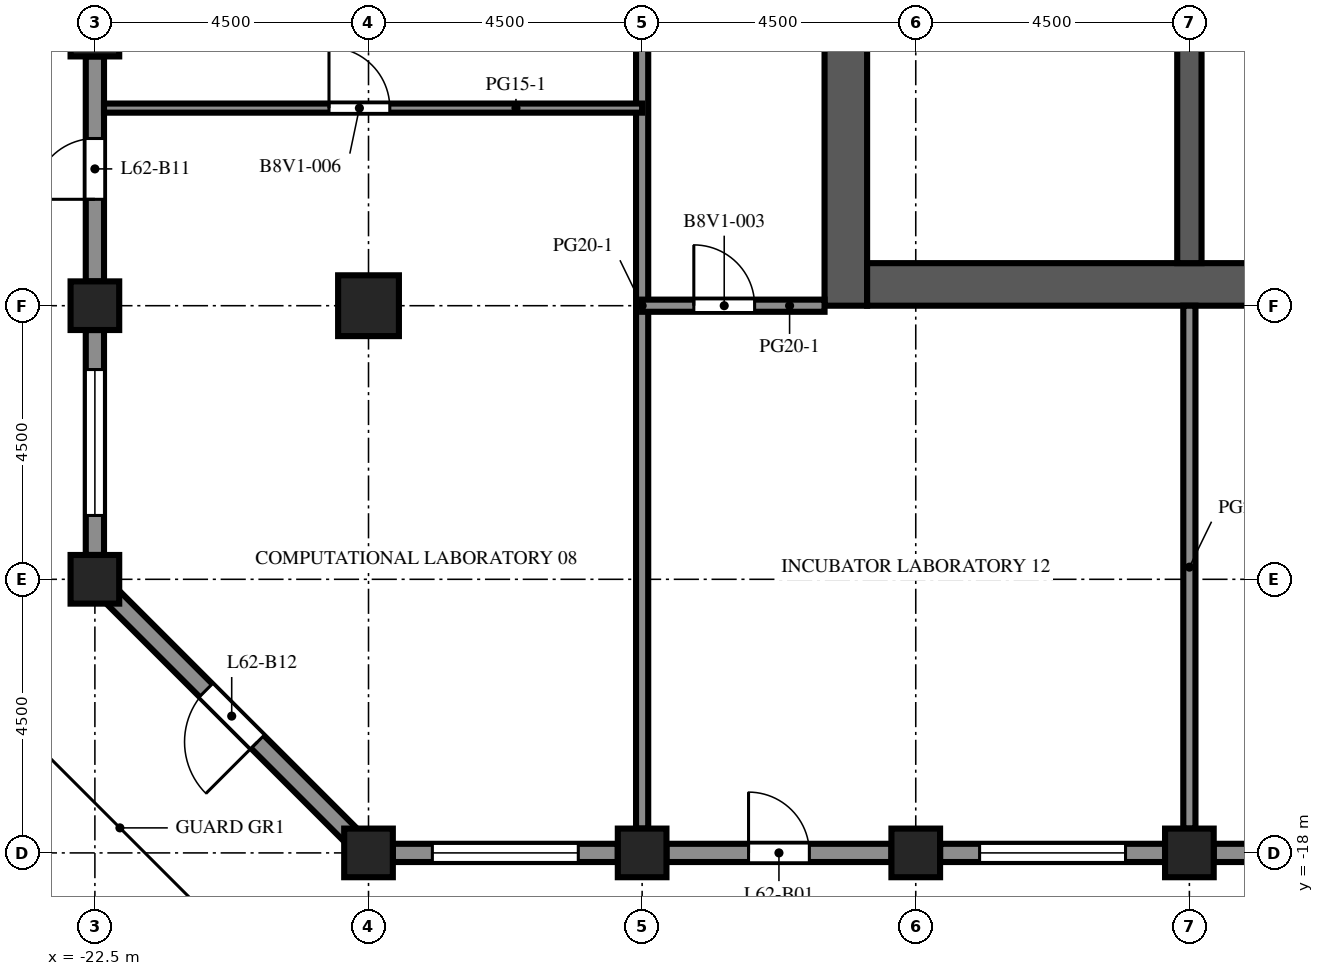
"""IFC4 building model, lengths in metres.
Left out: names, types, materials, properties, quantities, classifications, styles, units other than length and angle.
Written with IfcOpenShell. Run it as: python <this file> out.ifc"""

import sys

from ifc_helpers import new_model, si_unit, direction, frame, frame_2d, origin, origin_2d, place, context, subcontext, project, spatial, rectangle, extrude, element, fill, save


model = new_model("IFC4")
c1 = context("Model", 3, precision=1e-05, world=origin(), true_north=direction((0.0, 1.0)))
c2 = subcontext(c1, "Body", "Model", "MODEL_VIEW")
j1 = project(units=[si_unit("LENGTHUNIT", "METRE"), si_unit("PLANEANGLEUNIT", "RADIAN")], contexts=[c1])
p1 = place(None, origin())
s1 = spatial("IfcSite", under=j1, at=p1, CompositionType="ELEMENT")
p2 = place(p1, origin())
s2 = spatial("IfcBuilding", under=s1, at=p2, CompositionType="ELEMENT")
p3 = place(p2, frame((0.0, 0.0, 274.5)))
s3 = spatial("IfcBuildingStorey", under=s2, at=p3, CompositionType="ELEMENT", Elevation=274.5)
for number, where, z_axis, x_axis in (
    (1, (-22.5, -13.5, 0.0), (0.0, 0.0, 1.0), (1.0, 0.0, 0.0)),
    (2, (-22.5, -9.0, 0.0), (0.0, 0.0, 1.0), (1.0, 0.0, 0.0)),
    (3, (-22.5, -4.5, 0.0), (0.0, 0.0, 1.0), (1.0, 0.0, 0.0)),
    (4, (-18.0, -18.0, 0.0), (0.0, 0.0, 1.0), (1.0, 0.0, 0.0)),
    (5, (-13.5, -18.0, 0.0), (0.0, 0.0, 1.0), (1.0, 0.0, 0.0)),
    (6, (-9.0, -18.0, 0.0), (0.0, 0.0, 1.0), (1.0, 0.0, 0.0)),
    (7, (-4.5, -18.0, 0.0), (0.0, 0.0, 1.0), (1.0, 0.0, 0.0)),
):
    element("IfcColumn", number, at=place(p3, frame(where, z_axis=z_axis, x_axis=x_axis)), inside=s3, PredefinedType="COLUMN", context=c2, shape_type="SweptSolid", body=[
        extrude(rectangle(XDim=0.8, YDim=0.8, at=origin_2d()), origin(), (0.0, 0.0, 1.0), 4.1),
    ])
p4 = place(p3, frame((-18.0, -9.0, 0.0), z_axis=(0.0, 0.0, 1.0), x_axis=(1.0, 0.0, 0.0)))
e8 = element("IfcColumn", 8, at=p4, inside=s3, PredefinedType="COLUMN", context=c2, shape_type="SweptSolid", body=[
    extrude(rectangle(XDim=1.0, YDim=1.0, at=origin_2d()), origin(), (0.0, 0.0, 1.0), 4.1),
])
p5 = place(p3, frame((-10.15, -9.0, 0.0), z_axis=(0.0, 0.0, 1.0), x_axis=(0.0, 1.0, 0.0)))
e9 = element("IfcWall", 9, at=p5, inside=s3, PredefinedType="SHEAR", context=c2, shape_type="SweptSolid", body=[
    extrude(rectangle(XDim=27.5, YDim=0.7, at=frame_2d((13.75, 0.0))), origin(), (0.0, 0.0, 1.0), 4.1),
])
p6 = place(p5, frame((12.55, 0.0, 0.0)))
e10 = element("IfcOpeningElement", 10, at=p6, cuts=e9, PredefinedType="OPENING", context=c2, shape_type="SweptSolid", body=[
    extrude(rectangle(XDim=2.4, YDim=2.4, at=frame_2d((1.2, 1.2))), frame((0.0, 0.36, 0.0), z_axis=(0.0, -1.0, 0.0), x_axis=(1.0, 0.0, 0.0)), (0.0, 0.0, 1.0), 0.72),
])
p7 = place(p5, frame((6.825, 0.0, 0.0)))
e11 = element("IfcOpeningElement", 11, at=p7, cuts=e9, PredefinedType="OPENING", context=c2, shape_type="SweptSolid", body=[
    extrude(rectangle(XDim=1.2, YDim=2.1, at=frame_2d((0.6, 1.05))), frame((0.0, 0.36, 0.0), z_axis=(0.0, -1.0, 0.0), x_axis=(1.0, 0.0, 0.0)), (0.0, 0.0, 1.0), 0.72),
])
p8 = place(p5, frame((19.475, 0.0, 0.0)))
e12 = element("IfcOpeningElement", 12, at=p8, cuts=e9, PredefinedType="OPENING", context=c2, shape_type="SweptSolid", body=[
    extrude(rectangle(XDim=1.2, YDim=2.1, at=frame_2d((0.6, 1.05))), frame((0.0, 0.36, 0.0), z_axis=(0.0, -1.0, 0.0), x_axis=(1.0, 0.0, 0.0)), (0.0, 0.0, 1.0), 0.72),
])
p9 = place(p3, frame((-9.8, -8.65, 0.0), z_axis=(0.0, 0.0, 1.0), x_axis=(1.0, 0.0, 0.0)))
e13 = element("IfcWall", 13, at=p9, inside=s3, PredefinedType="SHEAR", context=c2, shape_type="SweptSolid", body=[
    extrude(rectangle(XDim=10.6, YDim=0.7, at=frame_2d((5.3, 0.0))), origin(), (0.0, 0.0, 1.0), 4.1),
])
p10 = place(p3, frame((-4.5, -8.3, 0.0), z_axis=(0.0, 0.0, 1.0), x_axis=(0.0, 1.0, 0.0)))
e14 = element("IfcWall", 14, at=p10, inside=s3, PredefinedType="SHEAR", context=c2, shape_type="SweptSolid", body=[
    extrude(rectangle(XDim=7.6, YDim=0.4, at=frame_2d((3.8, 0.0))), origin(), (0.0, 0.0, 1.0), 4.1),
])
p11 = place(p3, frame((-13.9, -18.0, 0.0), z_axis=(0.0, 0.0, 1.0), x_axis=(-1.0, 0.0, 0.0)))
e15 = element("IfcWall", 15, at=p11, inside=s3, PredefinedType="SOLIDWALL", context=c2, shape_type="SweptSolid", body=[
    extrude(rectangle(XDim=3.7, YDim=0.3, at=frame_2d((1.85, 0.0))), origin(), (0.0, 0.0, 1.0), 2.85),
])
p12 = place(p11, frame((0.65, 0.0, 0.8)))
e16 = element("IfcOpeningElement", 16, at=p12, cuts=e15, PredefinedType="OPENING", context=c2, shape_type="SweptSolid", body=[
    extrude(rectangle(XDim=2.4, YDim=1.7, at=frame_2d((1.2, 0.85))), frame((0.0, 0.16, 0.0), z_axis=(0.0, -1.0, 0.0), x_axis=(1.0, 0.0, 0.0)), (0.0, 0.0, 1.0), 0.32),
])
p13 = place(p3, frame((-9.4, -18.0, 0.0), z_axis=(0.0, 0.0, 1.0), x_axis=(-1.0, 0.0, 0.0)))
e17 = element("IfcWall", 17, at=p13, inside=s3, PredefinedType="SOLIDWALL", context=c2, shape_type="SweptSolid", body=[
    extrude(rectangle(XDim=3.7, YDim=0.3, at=frame_2d((1.85, 0.0))), origin(), (0.0, 0.0, 1.0), 2.85),
])
p14 = place(p13, frame((1.35, 0.0, 0.0)))
e18 = element("IfcOpeningElement", 18, at=p14, cuts=e17, PredefinedType="OPENING", context=c2, shape_type="SweptSolid", body=[
    extrude(rectangle(XDim=1.0, YDim=2.2, at=frame_2d((0.5, 1.1))), frame((0.0, 0.16, 0.0), z_axis=(0.0, -1.0, 0.0), x_axis=(1.0, 0.0, 0.0)), (0.0, 0.0, 1.0), 0.32),
])
p15 = place(p3, frame((-4.9, -18.0, 0.0), z_axis=(0.0, 0.0, 1.0), x_axis=(-1.0, 0.0, 0.0)))
e19 = element("IfcWall", 19, at=p15, inside=s3, PredefinedType="SOLIDWALL", context=c2, shape_type="SweptSolid", body=[
    extrude(rectangle(XDim=3.7, YDim=0.3, at=frame_2d((1.85, 0.0))), origin(), (0.0, 0.0, 1.0), 2.85),
])
p16 = place(p15, frame((0.65, 0.0, 0.8)))
e20 = element("IfcOpeningElement", 20, at=p16, cuts=e19, PredefinedType="OPENING", context=c2, shape_type="SweptSolid", body=[
    extrude(rectangle(XDim=2.4, YDim=1.7, at=frame_2d((1.2, 0.85))), frame((0.0, 0.16, 0.0), z_axis=(0.0, -1.0, 0.0), x_axis=(1.0, 0.0, 0.0)), (0.0, 0.0, 1.0), 0.32),
])
p17 = place(p3, frame((-0.4, -18.0, 0.0), z_axis=(0.0, 0.0, 1.0), x_axis=(-1.0, 0.0, 0.0)))
e21 = element("IfcWall", 21, at=p17, inside=s3, PredefinedType="SOLIDWALL", context=c2, shape_type="SweptSolid", body=[
    extrude(rectangle(XDim=3.7, YDim=0.3, at=frame_2d((1.85, 0.0))), origin(), (0.0, 0.0, 1.0), 2.85),
])
p18 = place(p17, frame((0.65, 0.0, 0.8)))
e22 = element("IfcOpeningElement", 22, at=p18, cuts=e21, PredefinedType="OPENING", context=c2, shape_type="SweptSolid", body=[
    extrude(rectangle(XDim=2.4, YDim=1.7, at=frame_2d((1.2, 0.85))), frame((0.0, 0.16, 0.0), z_axis=(0.0, -1.0, 0.0), x_axis=(1.0, 0.0, 0.0)), (0.0, 0.0, 1.0), 0.32),
])
p19 = place(p3, frame((-22.5, -8.6, 0.0), z_axis=(0.0, 0.0, 1.0), x_axis=(0.0, 1.0, 0.0)))
e23 = element("IfcWall", 23, at=p19, inside=s3, PredefinedType="SOLIDWALL", context=c2, shape_type="SweptSolid", body=[
    extrude(rectangle(XDim=3.7, YDim=0.3, at=frame_2d((1.85, 0.0))), origin(), (0.0, 0.0, 1.0), 2.85),
])
p20 = place(p19, frame((1.35, 0.0, 0.0)))
e24 = element("IfcOpeningElement", 24, at=p20, cuts=e23, PredefinedType="OPENING", context=c2, shape_type="SweptSolid", body=[
    extrude(rectangle(XDim=1.0, YDim=2.2, at=frame_2d((0.5, 1.1))), frame((0.0, 0.16, 0.0), z_axis=(0.0, -1.0, 0.0), x_axis=(1.0, 0.0, 0.0)), (0.0, 0.0, 1.0), 0.32),
])
p21 = place(p3, frame((-22.5, -13.1, 0.0), z_axis=(0.0, 0.0, 1.0), x_axis=(0.0, 1.0, 0.0)))
e25 = element("IfcWall", 25, at=p21, inside=s3, PredefinedType="SOLIDWALL", context=c2, shape_type="SweptSolid", body=[
    extrude(rectangle(XDim=3.7, YDim=0.3, at=frame_2d((1.85, 0.0))), origin(), (0.0, 0.0, 1.0), 2.85),
])
p22 = place(p21, frame((0.65, 0.0, 0.8)))
e26 = element("IfcOpeningElement", 26, at=p22, cuts=e25, PredefinedType="OPENING", context=c2, shape_type="SweptSolid", body=[
    extrude(rectangle(XDim=2.4, YDim=1.7, at=frame_2d((1.2, 0.85))), frame((0.0, 0.16, 0.0), z_axis=(0.0, -1.0, 0.0), x_axis=(1.0, 0.0, 0.0)), (0.0, 0.0, 1.0), 0.32),
])
p23 = place(p3, frame((-18.294, -17.706, 0.0), z_axis=(0.0, 0.0, 1.0), x_axis=(-0.707106781187, 0.707106781187, 0.0)))
e27 = element("IfcWall", 27, at=p23, inside=s3, PredefinedType="SOLIDWALL", context=c2, shape_type="SweptSolid", body=[
    extrude(rectangle(XDim=5.532, YDim=0.3, at=frame_2d((2.766, 0.0))), origin(), (0.0, 0.0, 1.0), 2.85),
])
p24 = place(p23, frame((2.166, 0.0, 0.0)))
e28 = element("IfcOpeningElement", 28, at=p24, cuts=e27, PredefinedType="OPENING", context=c2, shape_type="SweptSolid", body=[
    extrude(rectangle(XDim=1.2, YDim=2.2, at=frame_2d((0.6, 1.1))), frame((0.0, 0.16, 0.0), z_axis=(0.0, -1.0, 0.0), x_axis=(1.0, 0.0, 0.0)), (0.0, 0.0, 1.0), 0.32),
])
p25 = place(p3, frame((-4.3, -6.02, 0.0), z_axis=(0.0, 0.0, 1.0), x_axis=(1.0, 0.0, 0.0)))
e29 = element("IfcWall", 29, at=p25, inside=s3, PredefinedType="PARTITIONING", context=c2, shape_type="SweptSolid", body=[
    extrude(rectangle(XDim=3.5, YDim=0.1, at=frame_2d((1.75, 0.0))), origin(), (0.0, 0.0, 1.0), 3.65),
])
p26 = place(p3, frame((-13.5, -17.6, 0.0), z_axis=(0.0, 0.0, 1.0), x_axis=(0.0, 1.0, 0.0)))
e30 = element("IfcWall", 30, at=p26, inside=s3, PredefinedType="PARTITIONING", context=c2, shape_type="SweptSolid", body=[
    extrude(rectangle(XDim=20.85, YDim=0.2, at=frame_2d((10.425, 0.0))), origin(), (0.0, 0.0, 1.0), 3.65),
])
p27 = place(p26, frame((17.2, 0.0, 0.0)))
e31 = element("IfcOpeningElement", 31, at=p27, cuts=e30, PredefinedType="OPENING", context=c2, shape_type="SweptSolid", body=[
    extrude(rectangle(XDim=1.0, YDim=2.1, at=frame_2d((0.5, 1.05))), frame((0.0, 0.11, 0.0), z_axis=(0.0, -1.0, 0.0), x_axis=(1.0, 0.0, 0.0)), (0.0, 0.0, 1.0), 0.22),
])
p28 = place(p3, frame((-4.5, -17.6, 0.0), z_axis=(0.0, 0.0, 1.0), x_axis=(0.0, 1.0, 0.0)))
e32 = element("IfcWall", 32, at=p28, inside=s3, PredefinedType="PARTITIONING", context=c2, shape_type="SweptSolid", body=[
    extrude(rectangle(XDim=8.6, YDim=0.2, at=frame_2d((4.3, 0.0))), origin(), (0.0, 0.0, 1.0), 3.65),
])
p29 = place(p3, frame((-10.5, -9.0, 0.0), z_axis=(0.0, 0.0, 1.0), x_axis=(-1.0, 0.0, 0.0)))
e33 = element("IfcWall", 33, at=p29, inside=s3, PredefinedType="PARTITIONING", context=c2, shape_type="SweptSolid", body=[
    extrude(rectangle(XDim=3.0, YDim=0.2, at=frame_2d((1.5, 0.0))), origin(), (0.0, 0.0, 1.0), 3.65),
])
p30 = place(p29, frame((1.15, 0.0, 0.0)))
e34 = element("IfcOpeningElement", 34, at=p30, cuts=e33, PredefinedType="OPENING", context=c2, shape_type="SweptSolid", body=[
    extrude(rectangle(XDim=1.0, YDim=2.1, at=frame_2d((0.5, 1.05))), frame((0.0, 0.11, 0.0), z_axis=(0.0, -1.0, 0.0), x_axis=(1.0, 0.0, 0.0)), (0.0, 0.0, 1.0), 0.22),
])
p31 = place(p3, frame((-13.5, -5.75, 0.0), z_axis=(0.0, 0.0, 1.0), x_axis=(-1.0, 0.0, 0.0)))
e35 = element("IfcWall", 35, at=p31, inside=s3, PredefinedType="PARTITIONING", context=c2, shape_type="SweptSolid", body=[
    extrude(rectangle(XDim=8.85, YDim=0.15, at=frame_2d((4.425, 0.0))), origin(), (0.0, 0.0, 1.0), 3.65),
])
p32 = place(p31, frame((4.15, 0.0, 0.0)))
e36 = element("IfcOpeningElement", 36, at=p32, cuts=e35, PredefinedType="OPENING", context=c2, shape_type="SweptSolid", body=[
    extrude(rectangle(XDim=1.0, YDim=2.1, at=frame_2d((0.5, 1.05))), frame((0.0, 0.085, 0.0), z_axis=(0.0, -1.0, 0.0), x_axis=(1.0, 0.0, 0.0)), (0.0, 0.0, 1.0), 0.17),
])
p33 = place(p12, origin())
e37 = element("IfcWindow", 37, at=p33, inside=s3, PartitioningType="SINGLE_PANEL", PredefinedType="WINDOW", context=c2, shape_type="SweptSolid", body=[
    extrude(rectangle(XDim=2.4, YDim=1.7, at=frame_2d((1.2, 0.85))), frame((0.0, 0.03, 0.0), z_axis=(0.0, -1.0, 0.0), x_axis=(1.0, 0.0, 0.0)), (0.0, 0.0, 1.0), 0.06),
])
fill(e16, e37)
p34 = place(p14, origin())
e38 = element("IfcDoor", 38, at=p34, inside=s3, OperationType="SINGLE_SWING_RIGHT", PredefinedType="DOOR", context=c2, shape_type="SweptSolid", body=[
    extrude(rectangle(XDim=1.0, YDim=2.2, at=frame_2d((0.5, 1.1))), frame((0.0, 0.025, 0.0), z_axis=(0.0, -1.0, 0.0), x_axis=(1.0, 0.0, 0.0)), (0.0, 0.0, 1.0), 0.05),
])
fill(e18, e38)
p35 = place(p16, origin())
e39 = element("IfcWindow", 39, at=p35, inside=s3, PartitioningType="SINGLE_PANEL", PredefinedType="WINDOW", context=c2, shape_type="SweptSolid", body=[
    extrude(rectangle(XDim=2.4, YDim=1.7, at=frame_2d((1.2, 0.85))), frame((0.0, 0.03, 0.0), z_axis=(0.0, -1.0, 0.0), x_axis=(1.0, 0.0, 0.0)), (0.0, 0.0, 1.0), 0.06),
])
fill(e20, e39)
p36 = place(p20, origin())
e40 = element("IfcDoor", 40, at=p36, inside=s3, OperationType="SINGLE_SWING_LEFT", PredefinedType="DOOR", context=c2, shape_type="SweptSolid", body=[
    extrude(rectangle(XDim=1.0, YDim=2.2, at=frame_2d((0.5, 1.1))), frame((0.0, 0.025, 0.0), z_axis=(0.0, -1.0, 0.0), x_axis=(1.0, 0.0, 0.0)), (0.0, 0.0, 1.0), 0.05),
])
fill(e24, e40)
p37 = place(p22, origin())
e41 = element("IfcWindow", 41, at=p37, inside=s3, PartitioningType="SINGLE_PANEL", PredefinedType="WINDOW", context=c2, shape_type="SweptSolid", body=[
    extrude(rectangle(XDim=2.4, YDim=1.7, at=frame_2d((1.2, 0.85))), frame((0.0, 0.03, 0.0), z_axis=(0.0, -1.0, 0.0), x_axis=(1.0, 0.0, 0.0)), (0.0, 0.0, 1.0), 0.06),
])
fill(e26, e41)
p38 = place(p24, origin())
e42 = element("IfcDoor", 42, at=p38, inside=s3, OperationType="SINGLE_SWING_LEFT", PredefinedType="DOOR", context=c2, shape_type="SweptSolid", body=[
    extrude(rectangle(XDim=1.2, YDim=2.2, at=frame_2d((0.6, 1.1))), frame((0.0, 0.025, 0.0), z_axis=(0.0, -1.0, 0.0), x_axis=(1.0, 0.0, 0.0)), (0.0, 0.0, 1.0), 0.05),
])
fill(e28, e42)
p39 = place(p30, origin())
e43 = element("IfcDoor", 43, at=p39, inside=s3, OperationType="SINGLE_SWING_RIGHT", PredefinedType="DOOR", context=c2, shape_type="SweptSolid", body=[
    extrude(rectangle(XDim=1.0, YDim=2.1, at=frame_2d((0.5, 1.05))), frame((0.0, 0.025, 0.0), z_axis=(0.0, -1.0, 0.0), x_axis=(1.0, 0.0, 0.0)), (0.0, 0.0, 1.0), 0.05),
])
fill(e34, e43)
p40 = place(p32, origin())
e44 = element("IfcDoor", 44, at=p40, inside=s3, OperationType="SINGLE_SWING_RIGHT", PredefinedType="DOOR", context=c2, shape_type="SweptSolid", body=[
    extrude(rectangle(XDim=1.0, YDim=2.1, at=frame_2d((0.5, 1.05))), frame((0.0, 0.025, 0.0), z_axis=(0.0, -1.0, 0.0), x_axis=(1.0, 0.0, 0.0)), (0.0, 0.0, 1.0), 0.05),
])
fill(e36, e44)
save(model, sys.argv[1])
